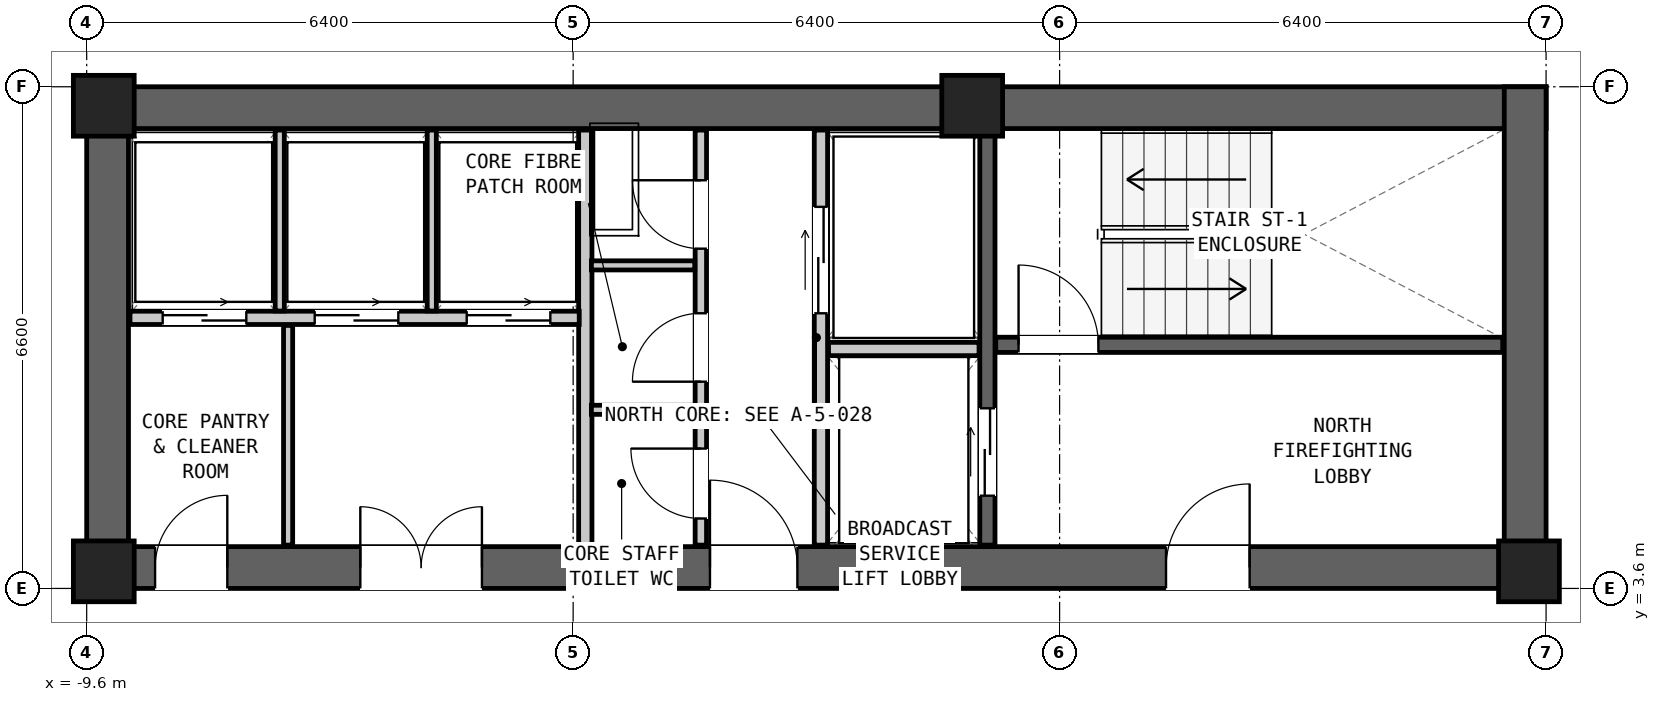
"""IFC4 building model, lengths in metres.
Left out: names, types, materials, properties, quantities, classifications, styles, units other than length and angle.
Written with IfcOpenShell. Run it as: python <this file> out.ifc"""

import sys

from ifc_helpers import new_model, si_unit, direction, frame, frame_2d, origin, origin_2d, place, context, subcontext, project, spatial, rectangle, extrude, element, fill, save


model = new_model("IFC4")
c1 = context("Model", 3, precision=1e-05, world=origin(), true_north=direction((0.0, 1.0)))
c2 = subcontext(c1, "Body", "Model", "MODEL_VIEW")
j1 = project(units=[si_unit("LENGTHUNIT", "METRE"), si_unit("PLANEANGLEUNIT", "RADIAN")], contexts=[c1])
p1 = place(None, origin())
s1 = spatial("IfcSite", under=j1, at=p1, CompositionType="ELEMENT")
p2 = place(p1, origin())
s2 = spatial("IfcBuilding", under=s1, at=p2, CompositionType="ELEMENT")
p3 = place(p2, frame((0.0, 0.0, 87.75)))
s3 = spatial("IfcBuildingStorey", under=s2, at=p3, CompositionType="ELEMENT", Elevation=87.75)
p4 = place(p3, frame((-9.6, 9.925, 0.0), z_axis=(0.0, 0.0, 1.0), x_axis=(1.0, 0.0, 0.0)))
e1 = element("IfcWall", 1, at=p4, inside=s3, PredefinedType="SHEAR", context=c2, shape_type="SweptSolid", body=[
    extrude(rectangle(XDim=19.2, YDim=0.55, at=frame_2d((9.6, 0.0))), origin(), (0.0, 0.0, 1.0), 3.05),
])
p5 = place(p3, frame((-9.6, 3.875, 0.0), z_axis=(0.0, 0.0, 1.0), x_axis=(1.0, 0.0, 0.0)))
e2 = element("IfcWall", 2, at=p5, inside=s3, PredefinedType="SHEAR", context=c2, shape_type="SweptSolid", body=[
    extrude(rectangle(XDim=19.2, YDim=0.55, at=frame_2d((9.6, 0.0))), origin(), (0.0, 0.0, 1.0), 3.05),
])
p6 = place(p5, frame((14.2, 0.0, 0.0)))
e3 = element("IfcOpeningElement", 3, at=p6, cuts=e2, PredefinedType="OPENING", context=c2, shape_type="SweptSolid", body=[
    extrude(rectangle(XDim=1.1, YDim=2.08, at=frame_2d((0.55, 1.04))), frame((0.0, 0.287, 0.0), z_axis=(0.0, -1.0, 0.0), x_axis=(1.0, 0.0, 0.0)), (0.0, 0.0, 1.0), 0.574),
])
p7 = place(p5, frame((8.2, 0.0, 0.0)))
e4 = element("IfcOpeningElement", 4, at=p7, cuts=e2, PredefinedType="OPENING", context=c2, shape_type="SweptSolid", body=[
    extrude(rectangle(XDim=1.15, YDim=2.1, at=frame_2d((0.575, 1.05))), frame((0.0, 0.287, 0.0), z_axis=(0.0, -1.0, 0.0), x_axis=(1.0, 0.0, 0.0)), (0.0, 0.0, 1.0), 0.574),
])
p8 = place(p5, frame((0.9, 0.0, 0.0)))
e5 = element("IfcOpeningElement", 5, at=p8, cuts=e2, PredefinedType="OPENING", context=c2, shape_type="SweptSolid", body=[
    extrude(rectangle(XDim=0.95, YDim=2.1, at=frame_2d((0.475, 1.05))), frame((0.0, 0.287, 0.0), z_axis=(0.0, -1.0, 0.0), x_axis=(1.0, 0.0, 0.0)), (0.0, 0.0, 1.0), 0.574),
])
p9 = place(p5, frame((3.6, 0.0, 0.0)))
e6 = element("IfcOpeningElement", 6, at=p9, cuts=e2, PredefinedType="OPENING", context=c2, shape_type="SweptSolid", body=[
    extrude(rectangle(XDim=1.6, YDim=2.12, at=frame_2d((0.8, 1.06))), frame((0.0, 0.287, 0.0), z_axis=(0.0, -1.0, 0.0), x_axis=(1.0, 0.0, 0.0)), (0.0, 0.0, 1.0), 0.574),
])
for number, where, z_axis, x_axis in (
    (7, (-9.325, 3.6, 0.0), (0.0, 0.0, 1.0), (0.0, 1.0, 0.0)),
    (8, (9.325, 3.6, 0.0), (0.0, 0.0, 1.0), (0.0, 1.0, 0.0)),
):
    element("IfcWall", number, at=place(p3, frame(where, z_axis=z_axis, x_axis=x_axis)), inside=s3, PredefinedType="SHEAR", context=c2, shape_type="SweptSolid", body=[
        extrude(rectangle(XDim=6.6, YDim=0.55, at=frame_2d((3.3, 0.0))), origin(), (0.0, 0.0, 1.0), 3.05),
    ])
for number, where, z_axis, x_axis in (
    (9, (-9.375, 9.95, 0.0), (0.0, 0.0, 1.0), (1.0, 0.0, 0.0)),
    (10, (2.05, 9.95, 0.0), (0.0, 0.0, 1.0), (1.0, 0.0, 0.0)),
    (11, (-9.375, 3.825, 0.0), (0.0, 0.0, 1.0), (1.0, 0.0, 0.0)),
    (12, (9.375, 3.825, 0.0), (0.0, 0.0, 1.0), (1.0, 0.0, 0.0)),
):
    element("IfcColumn", number, at=place(p3, frame(where, z_axis=z_axis, x_axis=x_axis)), inside=s3, PredefinedType="COLUMN", context=c2, shape_type="SweptSolid", body=[
        extrude(rectangle(XDim=0.8, YDim=0.8, at=origin_2d()), origin(), (0.0, 0.0, 1.0), 3.05),
    ])
p10 = place(p3, frame((2.36, 6.805, 0.0), z_axis=(0.0, 0.0, 1.0), x_axis=(1.0, 0.0, 0.0)))
e13 = element("IfcWall", 13, at=p10, inside=s3, PredefinedType="SHEAR", context=c2, shape_type="SweptSolid", body=[
    extrude(rectangle(XDim=6.67, YDim=0.2, at=frame_2d((3.335, 0.0))), origin(), (0.0, 0.0, 1.0), 2.83),
])
p11 = place(p10, frame((0.3, 0.0, 0.0)))
e14 = element("IfcOpeningElement", 14, at=p11, cuts=e13, PredefinedType="OPENING", context=c2, shape_type="SweptSolid", body=[
    extrude(rectangle(XDim=1.05, YDim=2.08, at=frame_2d((0.525, 1.04))), frame((0.0, 0.112, 0.0), z_axis=(0.0, -1.0, 0.0), x_axis=(1.0, 0.0, 0.0)), (0.0, 0.0, 1.0), 0.224),
])
p12 = place(p3, frame((2.25, 4.17, 0.0), z_axis=(0.0, 0.0, 1.0), x_axis=(0.0, 1.0, 0.0)))
e15 = element("IfcWall", 15, at=p12, inside=s3, PredefinedType="SHEAR", context=c2, shape_type="SweptSolid", body=[
    extrude(rectangle(XDim=5.46, YDim=0.2, at=frame_2d((2.73, 0.0))), origin(), (0.0, 0.0, 1.0), 2.83),
])
p13 = place(p12, frame((0.65, 0.0, 0.0)))
e16 = element("IfcOpeningElement", 16, at=p13, cuts=e15, PredefinedType="OPENING", context=c2, shape_type="SweptSolid", body=[
    extrude(rectangle(XDim=1.15, YDim=2.08, at=frame_2d((0.575, 1.04))), frame((0.0, 0.112, 0.0), z_axis=(0.0, -1.0, 0.0), x_axis=(1.0, 0.0, 0.0)), (0.0, 0.0, 1.0), 0.224),
])
p14 = place(p3, frame((0.06, 4.17, 0.0), z_axis=(0.0, 0.0, 1.0), x_axis=(0.0, 1.0, 0.0)))
e17 = element("IfcWall", 17, at=p14, inside=s3, PredefinedType="PARTITIONING", context=c2, shape_type="SweptSolid", body=[
    extrude(rectangle(XDim=5.46, YDim=0.175, at=frame_2d((2.73, 0.0))), origin(), (0.0, 0.0, 1.0), 2.83),
])
p15 = place(p14, frame((3.05, 0.0, 0.0)))
e18 = element("IfcOpeningElement", 18, at=p15, cuts=e17, PredefinedType="OPENING", context=c2, shape_type="SweptSolid", body=[
    extrude(rectangle(XDim=1.4, YDim=2.12, at=frame_2d((0.7, 1.06))), frame((0.0, 0.1, 0.0), z_axis=(0.0, -1.0, 0.0), x_axis=(1.0, 0.0, 0.0)), (0.0, 0.0, 1.0), 0.199),
])
p16 = place(p3, frame((0.16, 6.75, 0.0), z_axis=(0.0, 0.0, 1.0), x_axis=(1.0, 0.0, 0.0)))
e19 = element("IfcWall", 19, at=p16, inside=s3, PredefinedType="PARTITIONING", context=c2, shape_type="SweptSolid", body=[
    extrude(rectangle(XDim=1.98, YDim=0.175, at=frame_2d((0.99, 0.0))), origin(), (0.0, 0.0, 1.0), 2.83),
])
p17 = place(p3, frame((-3.04, 4.17, 0.0), z_axis=(0.0, 0.0, 1.0), x_axis=(0.0, 1.0, 0.0)))
e20 = element("IfcWall", 20, at=p17, inside=s3, PredefinedType="PARTITIONING", context=c2, shape_type="SweptSolid", body=[
    extrude(rectangle(XDim=5.46, YDim=0.175, at=frame_2d((2.73, 0.0))), origin(), (0.0, 0.0, 1.0), 2.83),
])
p18 = place(p3, frame((-1.52, 4.17, 0.0), z_axis=(0.0, 0.0, 1.0), x_axis=(0.0, 1.0, 0.0)))
e21 = element("IfcWall", 21, at=p18, inside=s3, PredefinedType="PARTITIONING", context=c2, shape_type="SweptSolid", body=[
    extrude(rectangle(XDim=5.46, YDim=0.15, at=frame_2d((2.73, 0.0))), origin(), (0.0, 0.0, 1.0), 2.83),
])
p19 = place(p18, frame((3.9, 0.0, 0.0)))
e22 = element("IfcOpeningElement", 22, at=p19, cuts=e21, PredefinedType="OPENING", context=c2, shape_type="SweptSolid", body=[
    extrude(rectangle(XDim=0.9, YDim=2.05, at=frame_2d((0.45, 1.025))), frame((0.0, 0.087, 0.0), z_axis=(0.0, -1.0, 0.0), x_axis=(1.0, 0.0, 0.0)), (0.0, 0.0, 1.0), 0.174),
])
p20 = place(p18, frame((2.15, 0.0, 0.0)))
e23 = element("IfcOpeningElement", 23, at=p20, cuts=e21, PredefinedType="OPENING", context=c2, shape_type="SweptSolid", body=[
    extrude(rectangle(XDim=0.9, YDim=2.05, at=frame_2d((0.45, 1.025))), frame((0.0, 0.087, 0.0), z_axis=(0.0, -1.0, 0.0), x_axis=(1.0, 0.0, 0.0)), (0.0, 0.0, 1.0), 0.174),
])
p21 = place(p18, frame((0.35, 0.0, 0.0)))
e24 = element("IfcOpeningElement", 24, at=p21, cuts=e21, PredefinedType="OPENING", context=c2, shape_type="SweptSolid", body=[
    extrude(rectangle(XDim=0.92, YDim=2.1, at=frame_2d((0.46, 1.05))), frame((0.0, 0.087, 0.0), z_axis=(0.0, -1.0, 0.0), x_axis=(1.0, 0.0, 0.0)), (0.0, 0.0, 1.0), 0.174),
])
for number, where, z_axis, x_axis in (
    (25, (-2.96, 5.95, 0.0), (0.0, 0.0, 1.0), (1.0, 0.0, 0.0)),
    (26, (-2.96, 7.85, 0.0), (0.0, 0.0, 1.0), (1.0, 0.0, 0.0)),
):
    element("IfcWall", number, at=place(p3, frame(where, z_axis=z_axis, x_axis=x_axis)), inside=s3, PredefinedType="PARTITIONING", context=c2, shape_type="SweptSolid", body=[
        extrude(rectangle(XDim=1.36, YDim=0.12, at=frame_2d((0.68, 0.0))), origin(), (0.0, 0.0, 1.0), 2.83),
    ])
p22 = place(p3, frame((-9.03, 7.16, 0.0), z_axis=(0.0, 0.0, 1.0), x_axis=(1.0, 0.0, 0.0)))
e27 = element("IfcWall", 27, at=p22, inside=s3, PredefinedType="PARTITIONING", context=c2, shape_type="SweptSolid", body=[
    extrude(rectangle(XDim=5.91, YDim=0.175, at=frame_2d((2.955, 0.0))), origin(), (0.0, 0.0, 1.0), 2.83),
])
p23 = place(p22, frame((0.43, 0.0, 0.0)))
e28 = element("IfcOpeningElement", 28, at=p23, cuts=e27, PredefinedType="OPENING", context=c2, shape_type="SweptSolid", body=[
    extrude(rectangle(XDim=1.1, YDim=2.06, at=frame_2d((0.55, 1.03))), frame((0.0, 0.1, 0.0), z_axis=(0.0, -1.0, 0.0), x_axis=(1.0, 0.0, 0.0)), (0.0, 0.0, 1.0), 0.199),
])
p24 = place(p22, frame((2.43, 0.0, 0.0)))
e29 = element("IfcOpeningElement", 29, at=p24, cuts=e27, PredefinedType="OPENING", context=c2, shape_type="SweptSolid", body=[
    extrude(rectangle(XDim=1.1, YDim=2.06, at=frame_2d((0.55, 1.03))), frame((0.0, 0.1, 0.0), z_axis=(0.0, -1.0, 0.0), x_axis=(1.0, 0.0, 0.0)), (0.0, 0.0, 1.0), 0.199),
])
p25 = place(p22, frame((4.43, 0.0, 0.0)))
e30 = element("IfcOpeningElement", 30, at=p25, cuts=e27, PredefinedType="OPENING", context=c2, shape_type="SweptSolid", body=[
    extrude(rectangle(XDim=1.1, YDim=2.06, at=frame_2d((0.55, 1.03))), frame((0.0, 0.1, 0.0), z_axis=(0.0, -1.0, 0.0), x_axis=(1.0, 0.0, 0.0)), (0.0, 0.0, 1.0), 0.199),
])
for number, where, z_axis, x_axis in (
    (31, (-7.06, 7.25, 0.0), (0.0, 0.0, 1.0), (0.0, 1.0, 0.0)),
    (32, (-5.06, 7.25, 0.0), (0.0, 0.0, 1.0), (0.0, 1.0, 0.0)),
):
    element("IfcWall", number, at=place(p3, frame(where, z_axis=z_axis, x_axis=x_axis)), inside=s3, PredefinedType="PARTITIONING", context=c2, shape_type="SweptSolid", body=[
        extrude(rectangle(XDim=2.38, YDim=0.12, at=frame_2d((1.19, 0.0))), origin(), (0.0, 0.0, 1.0), 2.83),
    ])
p26 = place(p3, frame((-6.95, 4.17, 0.0), z_axis=(0.0, 0.0, 1.0), x_axis=(0.0, 1.0, 0.0)))
e33 = element("IfcWall", 33, at=p26, inside=s3, PredefinedType="PARTITIONING", context=c2, shape_type="SweptSolid", body=[
    extrude(rectangle(XDim=2.89, YDim=0.12, at=frame_2d((1.445, 0.0))), origin(), (0.0, 0.0, 1.0), 2.83),
])
p27 = place(p11, origin())
e34 = element("IfcDoor", 34, at=p27, inside=s3, OperationType="SINGLE_SWING_LEFT", PredefinedType="DOOR", context=c2, shape_type="SweptSolid", body=[
    extrude(rectangle(XDim=1.05, YDim=2.08, at=frame_2d((0.525, 1.04))), frame((0.0, 0.025, 0.0), z_axis=(0.0, -1.0, 0.0), x_axis=(1.0, 0.0, 0.0)), (0.0, 0.0, 1.0), 0.05),
])
fill(e14, e34)
p28 = place(p6, origin())
e35 = element("IfcDoor", 35, at=p28, inside=s3, OperationType="SINGLE_SWING_RIGHT", PredefinedType="DOOR", context=c2, shape_type="SweptSolid", body=[
    extrude(rectangle(XDim=1.1, YDim=2.08, at=frame_2d((0.55, 1.04))), frame((0.0, 0.025, 0.0), z_axis=(0.0, -1.0, 0.0), x_axis=(1.0, 0.0, 0.0)), (0.0, 0.0, 1.0), 0.05),
])
fill(e3, e35)
p29 = place(p13, origin())
e36 = element("IfcDoor", 36, at=p29, inside=s3, OperationType="DOUBLE_DOOR_SLIDING", PredefinedType="DOOR", context=c2, shape_type="SweptSolid", body=[
    extrude(rectangle(XDim=1.15, YDim=2.08, at=frame_2d((0.575, 1.04))), frame((0.0, 0.025, 0.0), z_axis=(0.0, -1.0, 0.0), x_axis=(1.0, 0.0, 0.0)), (0.0, 0.0, 1.0), 0.05),
])
fill(e16, e36)
p30 = place(p15, origin())
e37 = element("IfcDoor", 37, at=p30, inside=s3, OperationType="DOUBLE_DOOR_SLIDING", PredefinedType="DOOR", context=c2, shape_type="SweptSolid", body=[
    extrude(rectangle(XDim=1.4, YDim=2.12, at=frame_2d((0.7, 1.06))), frame((0.0, 0.025, 0.0), z_axis=(0.0, -1.0, 0.0), x_axis=(1.0, 0.0, 0.0)), (0.0, 0.0, 1.0), 0.05),
])
fill(e18, e37)
p31 = place(p7, origin())
e38 = element("IfcDoor", 38, at=p31, inside=s3, OperationType="SINGLE_SWING_LEFT", PredefinedType="DOOR", context=c2, shape_type="SweptSolid", body=[
    extrude(rectangle(XDim=1.15, YDim=2.1, at=frame_2d((0.575, 1.05))), frame((0.0, 0.025, 0.0), z_axis=(0.0, -1.0, 0.0), x_axis=(1.0, 0.0, 0.0)), (0.0, 0.0, 1.0), 0.05),
])
fill(e4, e38)
p32 = place(p19, origin())
e39 = element("IfcDoor", 39, at=p32, inside=s3, OperationType="SINGLE_SWING_RIGHT", PredefinedType="DOOR", context=c2, shape_type="SweptSolid", body=[
    extrude(rectangle(XDim=0.9, YDim=2.05, at=frame_2d((0.45, 1.025))), frame((0.0, 0.025, 0.0), z_axis=(0.0, -1.0, 0.0), x_axis=(1.0, 0.0, 0.0)), (0.0, 0.0, 1.0), 0.05),
])
fill(e22, e39)
p33 = place(p20, origin())
e40 = element("IfcDoor", 40, at=p33, inside=s3, OperationType="SINGLE_SWING_LEFT", PredefinedType="DOOR", context=c2, shape_type="SweptSolid", body=[
    extrude(rectangle(XDim=0.9, YDim=2.05, at=frame_2d((0.45, 1.025))), frame((0.0, 0.025, 0.0), z_axis=(0.0, -1.0, 0.0), x_axis=(1.0, 0.0, 0.0)), (0.0, 0.0, 1.0), 0.05),
])
fill(e23, e40)
p34 = place(p21, origin())
e41 = element("IfcDoor", 41, at=p34, inside=s3, OperationType="SINGLE_SWING_RIGHT", PredefinedType="DOOR", context=c2, shape_type="SweptSolid", body=[
    extrude(rectangle(XDim=0.92, YDim=2.1, at=frame_2d((0.46, 1.05))), frame((0.0, 0.025, 0.0), z_axis=(0.0, -1.0, 0.0), x_axis=(1.0, 0.0, 0.0)), (0.0, 0.0, 1.0), 0.05),
])
fill(e24, e41)
p35 = place(p23, origin())
e42 = element("IfcDoor", 42, at=p35, inside=s3, OperationType="DOUBLE_DOOR_SLIDING", PredefinedType="DOOR", context=c2, shape_type="SweptSolid", body=[
    extrude(rectangle(XDim=1.1, YDim=2.06, at=frame_2d((0.55, 1.03))), frame((0.0, 0.025, 0.0), z_axis=(0.0, -1.0, 0.0), x_axis=(1.0, 0.0, 0.0)), (0.0, 0.0, 1.0), 0.05),
])
fill(e28, e42)
p36 = place(p24, origin())
e43 = element("IfcDoor", 43, at=p36, inside=s3, OperationType="DOUBLE_DOOR_SLIDING", PredefinedType="DOOR", context=c2, shape_type="SweptSolid", body=[
    extrude(rectangle(XDim=1.1, YDim=2.06, at=frame_2d((0.55, 1.03))), frame((0.0, 0.025, 0.0), z_axis=(0.0, -1.0, 0.0), x_axis=(1.0, 0.0, 0.0)), (0.0, 0.0, 1.0), 0.05),
])
fill(e29, e43)
p37 = place(p25, origin())
e44 = element("IfcDoor", 44, at=p37, inside=s3, OperationType="DOUBLE_DOOR_SLIDING", PredefinedType="DOOR", context=c2, shape_type="SweptSolid", body=[
    extrude(rectangle(XDim=1.1, YDim=2.06, at=frame_2d((0.55, 1.03))), frame((0.0, 0.025, 0.0), z_axis=(0.0, -1.0, 0.0), x_axis=(1.0, 0.0, 0.0)), (0.0, 0.0, 1.0), 0.05),
])
fill(e30, e44)
p38 = place(p8, origin())
e45 = element("IfcDoor", 45, at=p38, inside=s3, OperationType="SINGLE_SWING_RIGHT", PredefinedType="DOOR", context=c2, shape_type="SweptSolid", body=[
    extrude(rectangle(XDim=0.95, YDim=2.1, at=frame_2d((0.475, 1.05))), frame((0.0, 0.025, 0.0), z_axis=(0.0, -1.0, 0.0), x_axis=(1.0, 0.0, 0.0)), (0.0, 0.0, 1.0), 0.05),
])
fill(e5, e45)
p39 = place(p9, origin())
e46 = element("IfcDoor", 46, at=p39, inside=s3, OperationType="DOUBLE_DOOR_SINGLE_SWING", PredefinedType="DOOR", context=c2, shape_type="SweptSolid", body=[
    extrude(rectangle(XDim=1.6, YDim=2.12, at=frame_2d((0.8, 1.06))), frame((0.0, 0.025, 0.0), z_axis=(0.0, -1.0, 0.0), x_axis=(1.0, 0.0, 0.0)), (0.0, 0.0, 1.0), 0.05),
])
fill(e6, e46)
save(model, sys.argv[1])
